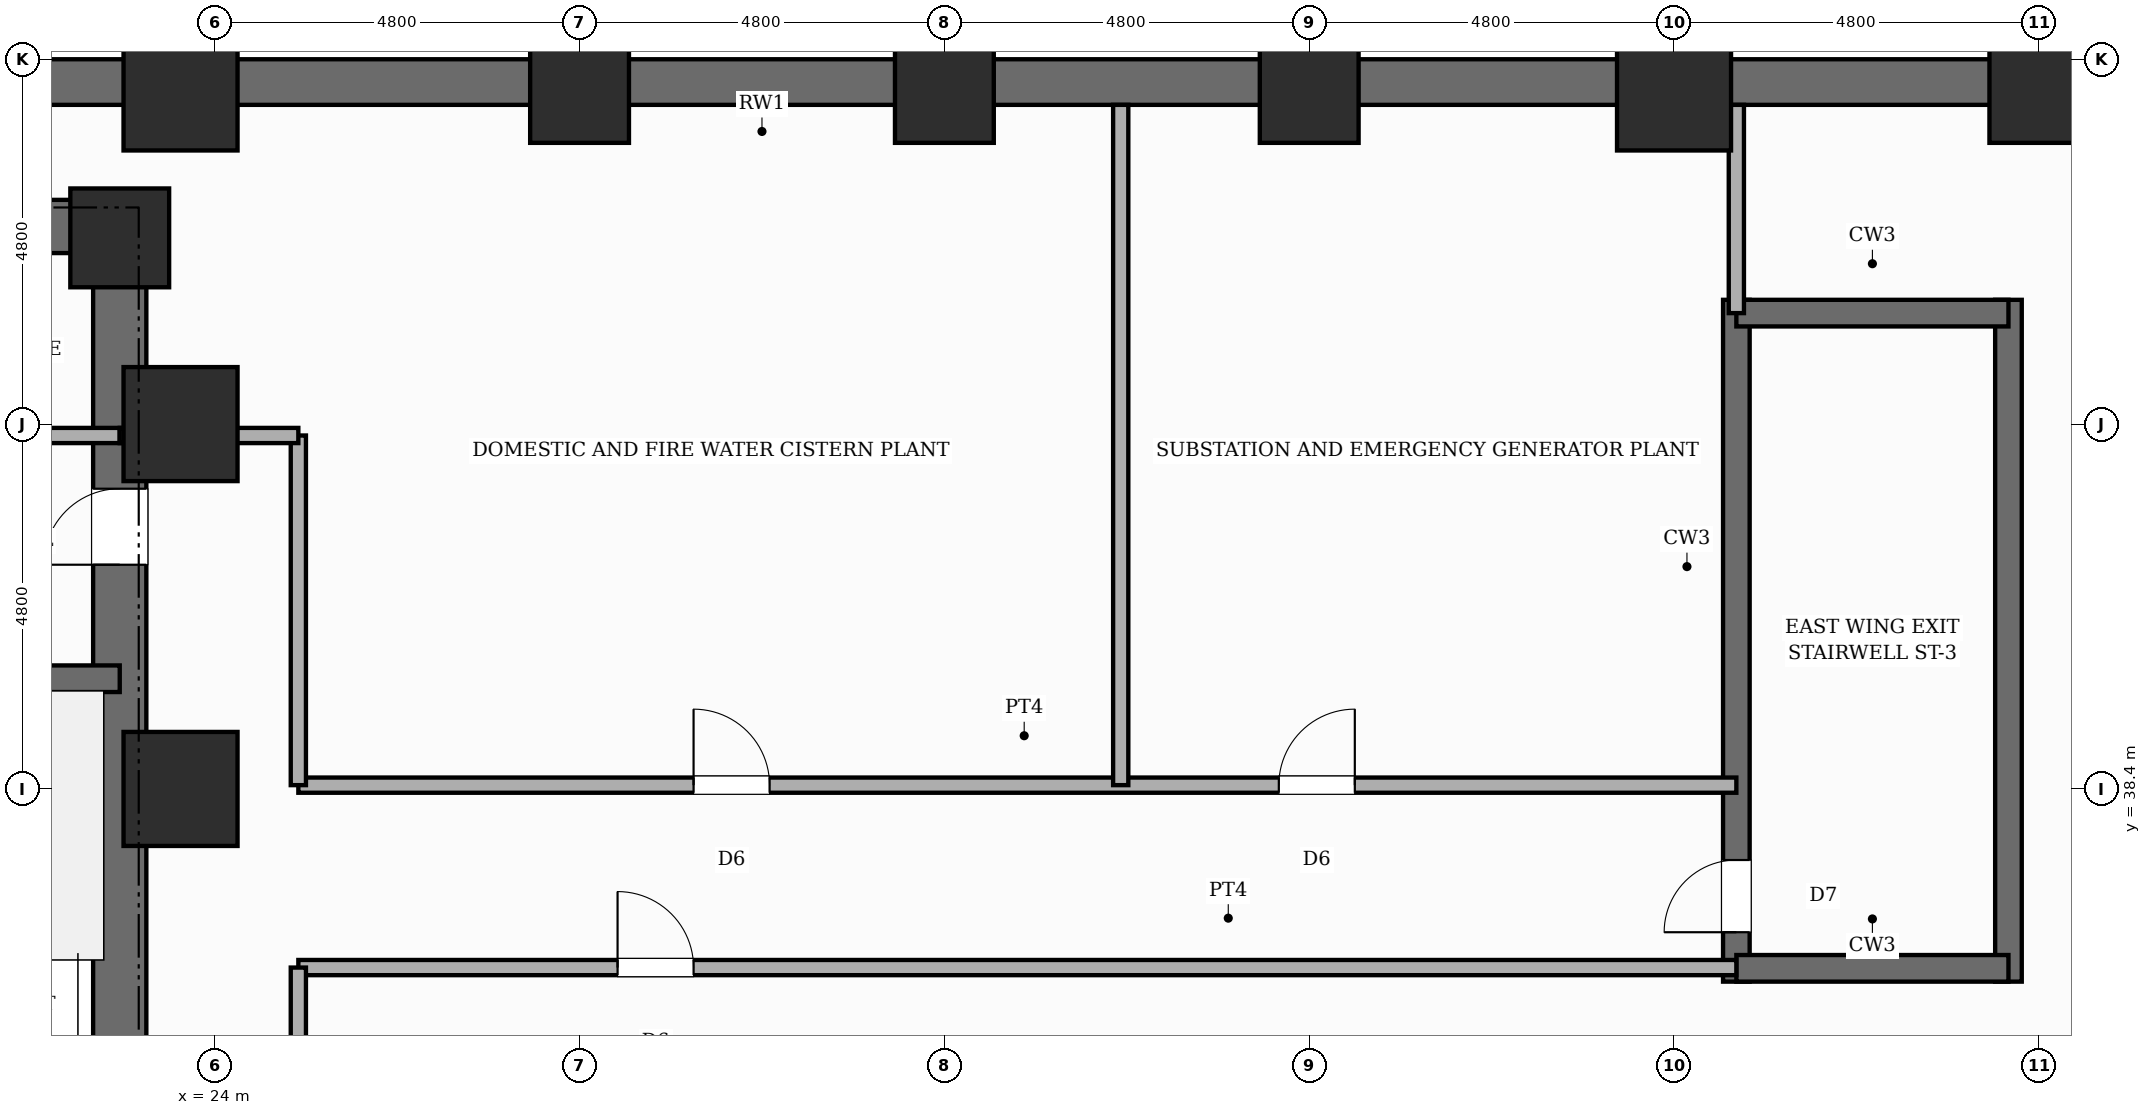
"""IFC4 building model, lengths in metres.
Left out: names, types, materials, properties, quantities, classifications, styles, units other than length and angle.
Written with IfcOpenShell. Run it as: python <this file> out.ifc"""

import sys

from ifc_helpers import new_model, si_unit, direction, frame, frame_2d, origin, origin_2d, place, context, subcontext, project, spatial, rectangle, extrude, element, fill, save


model = new_model("IFC4")
c1 = context("Model", 3, precision=1e-05, world=origin(), true_north=direction((0.0, 1.0)))
c2 = subcontext(c1, "Body", "Model", "MODEL_VIEW")
j1 = project(units=[si_unit("LENGTHUNIT", "METRE"), si_unit("PLANEANGLEUNIT", "RADIAN")], contexts=[c1])
p1 = place(None, origin())
s1 = spatial("IfcSite", under=j1, at=p1, CompositionType="ELEMENT")
p2 = place(p1, origin())
s2 = spatial("IfcBuilding", under=s1, at=p2, CompositionType="ELEMENT")
p3 = place(p2, frame((0.0, 0.0, -8.8)))
s3 = spatial("IfcBuildingStorey", under=s2, at=p3, CompositionType="ELEMENT", Elevation=-8.8)
p4 = place(p3, frame((62.1, 47.7, 0.0), z_axis=(0.0, 0.0, 1.0), x_axis=(-1.0, 0.0, 0.0)))
e1 = element("IfcWall", 1, at=p4, inside=s3, PredefinedType="USERDEFINED", context=c2, shape_type="SweptSolid", body=[
    extrude(rectangle(XDim=61.8, YDim=0.6, at=frame_2d((30.9, 0.0))), origin(), (0.0, 0.0, 1.0), 4.4),
])
p5 = place(p3, frame((22.75, 30.55, 0.0), z_axis=(0.0, 0.0, 1.0), x_axis=(0.0, 1.0, 0.0)))
e2 = element("IfcWall", 2, at=p5, inside=s3, PredefinedType="SHEAR", context=c2, shape_type="SweptSolid", body=[
    extrude(rectangle(XDim=15.6, YDim=0.7, at=frame_2d((7.8, 0.0))), origin(), (0.0, 0.0, 1.0), 4.4),
])
p6 = place(p5, frame((10.8, 0.0, 0.0)))
e3 = element("IfcOpeningElement", 3, at=p6, cuts=e2, PredefinedType="OPENING", context=c2, shape_type="SweptSolid", body=[
    extrude(rectangle(XDim=1.0, YDim=2.15, at=frame_2d((0.5, 1.075))), frame((0.0, 0.36, 0.0), z_axis=(0.0, -1.0, 0.0), x_axis=(1.0, 0.0, 0.0)), (0.0, 0.0, 1.0), 0.72),
])
p7 = place(p3, frame((6.05, 45.8, 0.0), z_axis=(0.0, 0.0, 1.0), x_axis=(1.0, 0.0, 0.0)))
e4 = element("IfcWall", 4, at=p7, inside=s3, PredefinedType="SHEAR", context=c2, shape_type="SweptSolid", body=[
    extrude(rectangle(XDim=16.7, YDim=0.7, at=frame_2d((8.35, 0.0))), origin(), (0.0, 0.0, 1.0), 4.4),
])
p8 = place(p3, frame((18.84, 39.85, 0.0), z_axis=(0.0, 0.0, 1.0), x_axis=(1.0, 0.0, 0.0)))
e5 = element("IfcWall", 5, at=p8, inside=s3, PredefinedType="SHEAR", context=c2, shape_type="SweptSolid", body=[
    extrude(rectangle(XDim=3.91, YDim=0.35, at=frame_2d((1.955, 0.0))), origin(), (0.0, 0.0, 1.0), 4.4),
])
p9 = place(p3, frame((44.02, 35.865, 0.0), z_axis=(0.0, 0.0, 1.0), x_axis=(0.0, 1.0, 0.0)))
e6 = element("IfcWall", 6, at=p9, inside=s3, PredefinedType="SHEAR", context=c2, shape_type="SweptSolid", body=[
    extrude(rectangle(XDim=8.97, YDim=0.35, at=frame_2d((4.485, 0.0))), origin(), (0.0, 0.0, 1.0), 4.4),
])
p10 = place(p9, frame((0.65, 0.0, 0.0)))
e7 = element("IfcOpeningElement", 7, at=p10, cuts=e6, PredefinedType="OPENING", context=c2, shape_type="SweptSolid", body=[
    extrude(rectangle(XDim=0.95, YDim=2.1, at=frame_2d((0.475, 1.05))), frame((0.0, 0.185, 0.0), z_axis=(0.0, -1.0, 0.0), x_axis=(1.0, 0.0, 0.0)), (0.0, 0.0, 1.0), 0.37),
])
p11 = place(p3, frame((47.6, 35.865, 0.0), z_axis=(0.0, 0.0, 1.0), x_axis=(0.0, 1.0, 0.0)))
e8 = element("IfcWall", 8, at=p11, inside=s3, PredefinedType="SHEAR", context=c2, shape_type="SweptSolid", body=[
    extrude(rectangle(XDim=8.97, YDim=0.35, at=frame_2d((4.485, 0.0))), origin(), (0.0, 0.0, 1.0), 4.4),
])
for number, where, z_axis, x_axis in (
    (9, (44.02, 36.04, 0.0), (0.0, 0.0, 1.0), (1.0, 0.0, 0.0)),
    (10, (44.02, 44.66, 0.0), (0.0, 0.0, 1.0), (1.0, 0.0, 0.0)),
):
    element("IfcWall", number, at=place(p3, frame(where, z_axis=z_axis, x_axis=x_axis)), inside=s3, PredefinedType="SHEAR", context=c2, shape_type="SweptSolid", body=[
        extrude(rectangle(XDim=3.58, YDim=0.35, at=frame_2d((1.79, 0.0))), origin(), (0.0, 0.0, 1.0), 4.4),
    ])
p12 = place(p3, frame((22.75, 45.65, 0.0), z_axis=(0.0, 0.0, 1.0), x_axis=(1.0, 0.0, 0.0)))
e11 = element("IfcColumn", 11, at=p12, inside=s3, PredefinedType="COLUMN", context=c2, shape_type="SweptSolid", body=[
    extrude(rectangle(XDim=1.3, YDim=1.3, at=origin_2d()), origin(), (0.0, 0.0, 1.0), 4.4),
])
for number, where, z_axis, x_axis in (
    (12, (23.55, 38.4, 0.0), (0.0, 0.0, 1.0), (1.0, 0.0, 0.0)),
    (13, (23.55, 43.2, 0.0), (0.0, 0.0, 1.0), (1.0, 0.0, 0.0)),
    (14, (23.55, 47.55, 0.0), (0.0, 0.0, 1.0), (1.0, 0.0, 0.0)),
):
    element("IfcColumn", number, at=place(p3, frame(where, z_axis=z_axis, x_axis=x_axis)), inside=s3, PredefinedType="USERDEFINED", context=c2, shape_type="SweptSolid", body=[
        extrude(rectangle(XDim=1.5, YDim=1.5, at=origin_2d()), origin(), (0.0, 0.0, 1.0), 4.4),
    ])
for number, where, z_axis, x_axis in (
    (15, (28.8, 47.55, 0.0), (0.0, 0.0, 1.0), (1.0, 0.0, 0.0)),
    (16, (33.6, 47.55, 0.0), (0.0, 0.0, 1.0), (1.0, 0.0, 0.0)),
    (17, (38.4, 47.55, 0.0), (0.0, 0.0, 1.0), (1.0, 0.0, 0.0)),
):
    element("IfcColumn", number, at=place(p3, frame(where, z_axis=z_axis, x_axis=x_axis)), inside=s3, PredefinedType="COLUMN", context=c2, shape_type="SweptSolid", body=[
        extrude(rectangle(XDim=1.3, YDim=1.3, at=origin_2d()), origin(), (0.0, 0.0, 1.0), 4.4),
    ])
p13 = place(p3, frame((43.2, 47.55, 0.0), z_axis=(0.0, 0.0, 1.0), x_axis=(1.0, 0.0, 0.0)))
e18 = element("IfcColumn", 18, at=p13, inside=s3, PredefinedType="USERDEFINED", context=c2, shape_type="SweptSolid", body=[
    extrude(rectangle(XDim=1.5, YDim=1.5, at=origin_2d()), origin(), (0.0, 0.0, 1.0), 4.4),
])
p14 = place(p3, frame((48.0, 47.55, 0.0), z_axis=(0.0, 0.0, 1.0), x_axis=(1.0, 0.0, 0.0)))
e19 = element("IfcColumn", 19, at=p14, inside=s3, PredefinedType="COLUMN", context=c2, shape_type="SweptSolid", body=[
    extrude(rectangle(XDim=1.3, YDim=1.3, at=origin_2d()), origin(), (0.0, 0.0, 1.0), 4.4),
])
p15 = place(p3, frame((18.84, 43.05, 0.0), z_axis=(0.0, 0.0, 1.0), x_axis=(1.0, 0.0, 0.0)))
e20 = element("IfcWall", 20, at=p15, inside=s3, PredefinedType="POLYGONAL", context=c2, shape_type="SweptSolid", body=[
    extrude(rectangle(XDim=3.91, YDim=0.2, at=frame_2d((1.955, 0.0))), origin(), (0.0, 0.0, 1.0), 3.28),
])
p16 = place(p15, frame((1.35, 0.0, 0.0)))
e21 = element("IfcOpeningElement", 21, at=p16, cuts=e20, PredefinedType="OPENING", context=c2, shape_type="SweptSolid", body=[
    extrude(rectangle(XDim=0.88, YDim=2.1, at=frame_2d((0.44, 1.05))), frame((0.0, 0.11, 0.0), z_axis=(0.0, -1.0, 0.0), x_axis=(1.0, 0.0, 0.0)), (0.0, 0.0, 1.0), 0.22),
])
p17 = place(p3, frame((25.1, 36.05, 0.0), z_axis=(0.0, 0.0, 1.0), x_axis=(1.0, 0.0, 0.0)))
e22 = element("IfcWall", 22, at=p17, inside=s3, PredefinedType="PARTITIONING", context=c2, shape_type="SweptSolid", body=[
    extrude(rectangle(XDim=18.92, YDim=0.2, at=frame_2d((9.46, 0.0))), origin(), (0.0, 0.0, 1.0), 4.08),
])
p18 = place(p17, frame((4.2, 0.0, 0.0)))
e23 = element("IfcOpeningElement", 23, at=p18, cuts=e22, PredefinedType="OPENING", context=c2, shape_type="SweptSolid", body=[
    extrude(rectangle(XDim=1.0, YDim=2.15, at=frame_2d((0.5, 1.075))), frame((0.0, 0.11, 0.0), z_axis=(0.0, -1.0, 0.0), x_axis=(1.0, 0.0, 0.0)), (0.0, 0.0, 1.0), 0.22),
])
p19 = place(p3, frame((25.1, 38.45, 0.0), z_axis=(0.0, 0.0, 1.0), x_axis=(1.0, 0.0, 0.0)))
e24 = element("IfcWall", 24, at=p19, inside=s3, PredefinedType="PARTITIONING", context=c2, shape_type="SweptSolid", body=[
    extrude(rectangle(XDim=18.92, YDim=0.2, at=frame_2d((9.46, 0.0))), origin(), (0.0, 0.0, 1.0), 4.08),
])
p20 = place(p19, frame((5.2, 0.0, 0.0)))
e25 = element("IfcOpeningElement", 25, at=p20, cuts=e24, PredefinedType="OPENING", context=c2, shape_type="SweptSolid", body=[
    extrude(rectangle(XDim=1.0, YDim=2.15, at=frame_2d((0.5, 1.075))), frame((0.0, 0.11, 0.0), z_axis=(0.0, -1.0, 0.0), x_axis=(1.0, 0.0, 0.0)), (0.0, 0.0, 1.0), 0.22),
])
p21 = place(p19, frame((12.9, 0.0, 0.0)))
e26 = element("IfcOpeningElement", 26, at=p21, cuts=e24, PredefinedType="OPENING", context=c2, shape_type="SweptSolid", body=[
    extrude(rectangle(XDim=1.0, YDim=2.15, at=frame_2d((0.5, 1.075))), frame((0.0, 0.11, 0.0), z_axis=(0.0, -1.0, 0.0), x_axis=(1.0, 0.0, 0.0)), (0.0, 0.0, 1.0), 0.22),
])
p22 = place(p3, frame((25.1, 25.8, 0.0), z_axis=(0.0, 0.0, 1.0), x_axis=(0.0, 1.0, 0.0)))
e27 = element("IfcWall", 27, at=p22, inside=s3, PredefinedType="PARTITIONING", context=c2, shape_type="SweptSolid", body=[
    extrude(rectangle(XDim=10.25, YDim=0.2, at=frame_2d((5.125, 0.0))), origin(), (0.0, 0.0, 1.0), 4.08),
])
p23 = place(p3, frame((25.1, 38.45, 0.0), z_axis=(0.0, 0.0, 1.0), x_axis=(0.0, 1.0, 0.0)))
e28 = element("IfcWall", 28, at=p23, inside=s3, PredefinedType="PARTITIONING", context=c2, shape_type="SweptSolid", body=[
    extrude(rectangle(XDim=4.6, YDim=0.2, at=frame_2d((2.3, 0.0))), origin(), (0.0, 0.0, 1.0), 4.08),
])
p24 = place(p3, frame((22.75, 43.05, 0.0), z_axis=(0.0, 0.0, 1.0), x_axis=(1.0, 0.0, 0.0)))
e29 = element("IfcWall", 29, at=p24, inside=s3, PredefinedType="PARTITIONING", context=c2, shape_type="SweptSolid", body=[
    extrude(rectangle(XDim=2.35, YDim=0.2, at=frame_2d((1.175, 0.0))), origin(), (0.0, 0.0, 1.0), 3.28),
])
p25 = place(p3, frame((35.92, 38.45, 0.0), z_axis=(0.0, 0.0, 1.0), x_axis=(0.0, 1.0, 0.0)))
e30 = element("IfcWall", 30, at=p25, inside=s3, PredefinedType="PARTITIONING", context=c2, shape_type="SweptSolid", body=[
    extrude(rectangle(XDim=8.95, YDim=0.2, at=frame_2d((4.475, 0.0))), origin(), (0.0, 0.0, 1.0), 4.08),
])
p26 = place(p3, frame((44.02, 44.66, 0.0), z_axis=(0.0, 0.0, 1.0), x_axis=(0.0, 1.0, 0.0)))
e31 = element("IfcWall", 31, at=p26, inside=s3, PredefinedType="PARTITIONING", context=c2, shape_type="SweptSolid", body=[
    extrude(rectangle(XDim=2.74, YDim=0.2, at=frame_2d((1.37, 0.0))), origin(), (0.0, 0.0, 1.0), 4.08),
])
p27 = place(p10, origin())
e32 = element("IfcDoor", 32, at=p27, inside=s3, OperationType="SINGLE_SWING_LEFT", PredefinedType="DOOR", context=c2, shape_type="SweptSolid", body=[
    extrude(rectangle(XDim=0.95, YDim=2.1, at=frame_2d((0.475, 1.05))), frame((0.0, 0.025, 0.0), z_axis=(0.0, -1.0, 0.0), x_axis=(1.0, 0.0, 0.0)), (0.0, 0.0, 1.0), 0.05),
])
fill(e7, e32)
p28 = place(p6, origin())
e33 = element("IfcDoor", 33, at=p28, inside=s3, OperationType="SINGLE_SWING_LEFT", PredefinedType="DOOR", context=c2, shape_type="SweptSolid", body=[
    extrude(rectangle(XDim=1.0, YDim=2.15, at=frame_2d((0.5, 1.075))), frame((0.0, 0.025, 0.0), z_axis=(0.0, -1.0, 0.0), x_axis=(1.0, 0.0, 0.0)), (0.0, 0.0, 1.0), 0.05),
])
fill(e3, e33)
p29 = place(p18, origin())
e34 = element("IfcDoor", 34, at=p29, inside=s3, OperationType="SINGLE_SWING_LEFT", PredefinedType="DOOR", context=c2, shape_type="SweptSolid", body=[
    extrude(rectangle(XDim=1.0, YDim=2.15, at=frame_2d((0.5, 1.075))), frame((0.0, 0.025, 0.0), z_axis=(0.0, -1.0, 0.0), x_axis=(1.0, 0.0, 0.0)), (0.0, 0.0, 1.0), 0.05),
])
fill(e23, e34)
p30 = place(p20, origin())
e35 = element("IfcDoor", 35, at=p30, inside=s3, OperationType="SINGLE_SWING_LEFT", PredefinedType="DOOR", context=c2, shape_type="SweptSolid", body=[
    extrude(rectangle(XDim=1.0, YDim=2.15, at=frame_2d((0.5, 1.075))), frame((0.0, 0.025, 0.0), z_axis=(0.0, -1.0, 0.0), x_axis=(1.0, 0.0, 0.0)), (0.0, 0.0, 1.0), 0.05),
])
fill(e25, e35)
p31 = place(p21, origin())
e36 = element("IfcDoor", 36, at=p31, inside=s3, OperationType="SINGLE_SWING_RIGHT", PredefinedType="DOOR", context=c2, shape_type="SweptSolid", body=[
    extrude(rectangle(XDim=1.0, YDim=2.15, at=frame_2d((0.5, 1.075))), frame((0.0, 0.025, 0.0), z_axis=(0.0, -1.0, 0.0), x_axis=(1.0, 0.0, 0.0)), (0.0, 0.0, 1.0), 0.05),
])
fill(e26, e36)
save(model, sys.argv[1])
